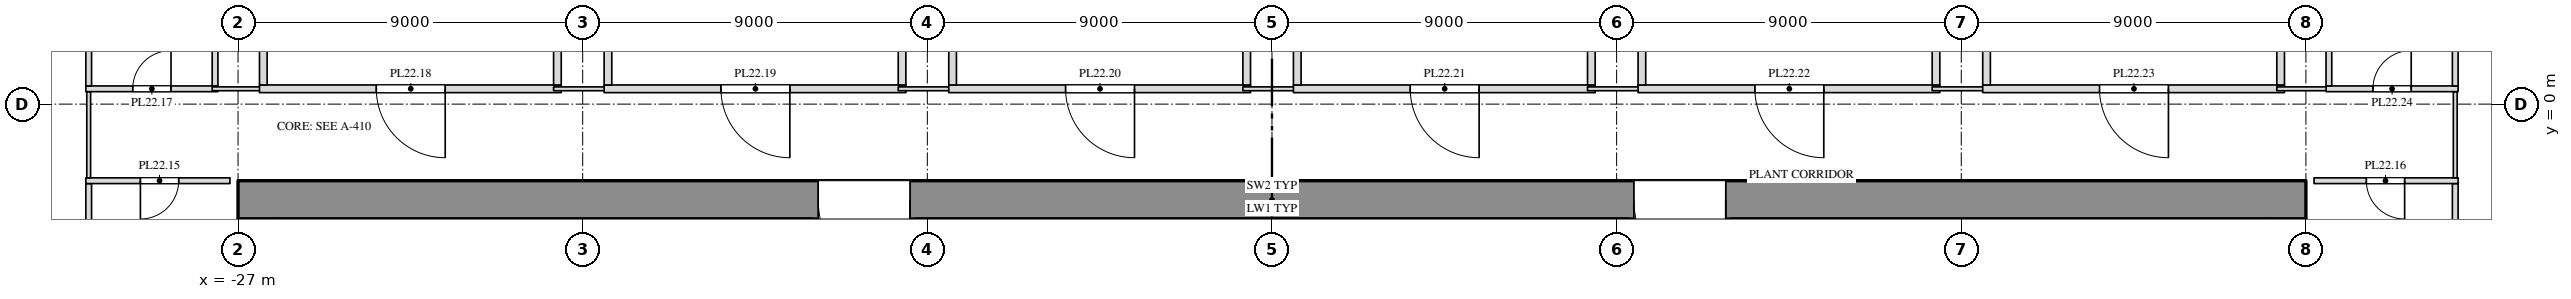
"""IFC4 building model, lengths in metres.
Left out: names, types, materials, properties, quantities, classifications, styles, units other than length and angle.
Written with IfcOpenShell. Run it as: python <this file> out.ifc"""

import sys

from ifc_helpers import new_model, si_unit, direction, frame, frame_2d, origin, place, context, subcontext, project, spatial, rectangle, extrude, element, fill, save


model = new_model("IFC4")
c1 = context("Model", 3, precision=1e-05, world=origin(), true_north=direction((0.0, 1.0)))
c2 = subcontext(c1, "Body", "Model", "MODEL_VIEW")
j1 = project(units=[si_unit("LENGTHUNIT", "METRE"), si_unit("PLANEANGLEUNIT", "RADIAN")], contexts=[c1])
p1 = place(None, origin())
s1 = spatial("IfcSite", under=j1, at=p1, CompositionType="ELEMENT")
p2 = place(p1, origin())
s2 = spatial("IfcBuilding", under=s1, at=p2, CompositionType="ELEMENT")
p3 = place(p2, frame((0.0, 0.0, 104.5)))
s3 = spatial("IfcBuildingStorey", under=s2, at=p3, CompositionType="ELEMENT", Elevation=104.5)
p4 = place(p3, frame((-27.0, -2.5, 0.0), z_axis=(0.0, 0.0, 1.0), x_axis=(1.0, 0.0, 0.0)))
e1 = element("IfcWall", 1, at=p4, inside=s3, PredefinedType="SHEAR", context=c2, shape_type="SweptSolid", body=[
    extrude(rectangle(XDim=54.0, YDim=1.0, at=frame_2d((27.0, 0.0))), origin(), (0.0, 0.0, 1.0), 3.8),
])
p5 = place(p4, frame((15.15, 0.0, 0.0)))
e2 = element("IfcOpeningElement", 2, at=p5, cuts=e1, PredefinedType="OPENING", context=c2, shape_type="SweptSolid", body=[
    extrude(rectangle(XDim=2.4, YDim=2.1, at=frame_2d((1.2, 1.05))), frame((0.0, 0.512, 0.0), z_axis=(0.0, -1.0, 0.0), x_axis=(1.0, 0.0, 0.0)), (0.0, 0.0, 1.0), 1.024),
])
p6 = place(p4, frame((36.45, 0.0, 0.0)))
e3 = element("IfcOpeningElement", 3, at=p6, cuts=e1, PredefinedType="OPENING", context=c2, shape_type="SweptSolid", body=[
    extrude(rectangle(XDim=2.4, YDim=2.1, at=frame_2d((1.2, 1.05))), frame((0.0, 0.512, 0.0), z_axis=(0.0, -1.0, 0.0), x_axis=(1.0, 0.0, 0.0)), (0.0, 0.0, 1.0), 1.024),
])
for number, where, z_axis, x_axis in (
    (4, (-30.9, -13.925, 0.0), (0.0, 0.0, 1.0), (0.0, 1.0, 0.0)),
    (5, (30.9, -13.925, 0.0), (0.0, 0.0, 1.0), (0.0, 1.0, 0.0)),
):
    element("IfcWall", number, at=place(p3, frame(where, z_axis=z_axis, x_axis=x_axis)), inside=s3, PredefinedType="PARTITIONING", context=c2, shape_type="SweptSolid", body=[
        extrude(rectangle(XDim=11.85, YDim=0.15, at=frame_2d((5.925, 0.0))), origin(), (0.0, 0.0, 1.0), 3.8),
    ])
p7 = place(p3, frame((-30.975, -2.0, 0.0), z_axis=(0.0, 0.0, 1.0), x_axis=(1.0, 0.0, 0.0)))
e6 = element("IfcWall", 6, at=p7, inside=s3, PredefinedType="PARTITIONING", context=c2, shape_type="SweptSolid", body=[
    extrude(rectangle(XDim=3.763, YDim=0.15, at=frame_2d((1.882, 0.0))), origin(), (0.0, 0.0, 1.0), 3.8),
])
p8 = place(p7, frame((1.425, 0.0, 0.0)))
e7 = element("IfcOpeningElement", 7, at=p8, cuts=e6, PredefinedType="OPENING", context=c2, shape_type="SweptSolid", body=[
    extrude(rectangle(XDim=1.0, YDim=2.1, at=frame_2d((0.5, 1.05))), frame((0.0, 0.087, 0.0), z_axis=(0.0, -1.0, 0.0), x_axis=(1.0, 0.0, 0.0)), (0.0, 0.0, 1.0), 0.174),
])
p9 = place(p3, frame((-30.9, -1.925, 0.0), z_axis=(0.0, 0.0, 1.0), x_axis=(0.0, 1.0, 0.0)))
e8 = element("IfcWall", 8, at=p9, inside=s3, PredefinedType="PARTITIONING", context=c2, shape_type="SweptSolid", body=[
    extrude(rectangle(XDim=2.25, YDim=0.1, at=frame_2d((1.125, 0.0))), origin(), (0.0, 0.0, 1.0), 3.8),
])
p10 = place(p3, frame((27.212, -2.0, 0.0), z_axis=(0.0, 0.0, 1.0), x_axis=(1.0, 0.0, 0.0)))
e9 = element("IfcWall", 9, at=p10, inside=s3, PredefinedType="PARTITIONING", context=c2, shape_type="SweptSolid", body=[
    extrude(rectangle(XDim=3.763, YDim=0.15, at=frame_2d((1.882, 0.0))), origin(), (0.0, 0.0, 1.0), 3.8),
])
p11 = place(p10, frame((1.366, 0.0, 0.0)))
e10 = element("IfcOpeningElement", 10, at=p11, cuts=e9, PredefinedType="OPENING", context=c2, shape_type="SweptSolid", body=[
    extrude(rectangle(XDim=1.0, YDim=2.1, at=frame_2d((0.5, 1.05))), frame((0.0, 0.087, 0.0), z_axis=(0.0, -1.0, 0.0), x_axis=(1.0, 0.0, 0.0)), (0.0, 0.0, 1.0), 0.174),
])
p12 = place(p3, frame((30.9, -1.925, 0.0), z_axis=(0.0, 0.0, 1.0), x_axis=(0.0, 1.0, 0.0)))
e11 = element("IfcWall", 11, at=p12, inside=s3, PredefinedType="PARTITIONING", context=c2, shape_type="SweptSolid", body=[
    extrude(rectangle(XDim=2.25, YDim=0.1, at=frame_2d((1.125, 0.0))), origin(), (0.0, 0.0, 1.0), 3.8),
])
p13 = place(p3, frame((-30.975, 0.4, 0.0), z_axis=(0.0, 0.0, 1.0), x_axis=(1.0, 0.0, 0.0)))
e12 = element("IfcWall", 12, at=p13, inside=s3, PredefinedType="PARTITIONING", context=c2, shape_type="SweptSolid", body=[
    extrude(rectangle(XDim=3.45, YDim=0.15, at=frame_2d((1.725, 0.0))), origin(), (0.0, 0.0, 1.0), 3.8),
])
p14 = place(p13, frame((1.225, 0.0, 0.0)))
e13 = element("IfcOpeningElement", 13, at=p14, cuts=e12, PredefinedType="OPENING", context=c2, shape_type="SweptSolid", body=[
    extrude(rectangle(XDim=1.0, YDim=2.1, at=frame_2d((0.5, 1.05))), frame((0.0, 0.087, 0.0), z_axis=(0.0, -1.0, 0.0), x_axis=(1.0, 0.0, 0.0)), (0.0, 0.0, 1.0), 0.174),
])
p15 = place(p3, frame((-30.9, 0.475, 0.0), z_axis=(0.0, 0.0, 1.0), x_axis=(0.0, 1.0, 0.0)))
e14 = element("IfcWall", 14, at=p15, inside=s3, PredefinedType="PARTITIONING", context=c2, shape_type="SweptSolid", body=[
    extrude(rectangle(XDim=16.465, YDim=0.15, at=frame_2d((8.232, 0.0))), origin(), (0.0, 0.0, 1.0), 3.8),
])
p16 = place(p3, frame((-27.675, 0.4, 0.0), z_axis=(0.0, 0.0, 1.0), x_axis=(1.0, 0.0, 0.0)))
e15 = element("IfcWall", 15, at=p16, inside=s3, PredefinedType="PARTITIONING", context=c2, shape_type="SweptSolid", body=[
    extrude(rectangle(XDim=1.435, YDim=0.1, at=frame_2d((0.718, 0.0))), origin(), (0.0, 0.0, 1.0), 3.8),
])
p17 = place(p3, frame((-27.6, 0.475, 0.0), z_axis=(0.0, 0.0, 1.0), x_axis=(0.0, 1.0, 0.0)))
e16 = element("IfcWall", 16, at=p17, inside=s3, PredefinedType="PARTITIONING", context=c2, shape_type="SweptSolid", body=[
    extrude(rectangle(XDim=17.505, YDim=0.15, at=frame_2d((8.752, 0.0))), origin(), (0.0, 0.0, 1.0), 3.8),
])
p18 = place(p3, frame((-26.44, 0.4, 0.0), z_axis=(0.0, 0.0, 1.0), x_axis=(1.0, 0.0, 0.0)))
e17 = element("IfcWall", 17, at=p18, inside=s3, PredefinedType="PARTITIONING", context=c2, shape_type="SweptSolid", body=[
    extrude(rectangle(XDim=7.88, YDim=0.2, at=frame_2d((3.94, 0.0))), origin(), (0.0, 0.0, 1.0), 3.8),
])
p19 = place(p18, frame((3.05, 0.0, 0.0)))
e18 = element("IfcOpeningElement", 18, at=p19, cuts=e17, PredefinedType="OPENING", context=c2, shape_type="SweptSolid", body=[
    extrude(rectangle(XDim=1.8, YDim=2.1, at=frame_2d((0.9, 1.05))), frame((0.0, 0.112, 0.0), z_axis=(0.0, -1.0, 0.0), x_axis=(1.0, 0.0, 0.0)), (0.0, 0.0, 1.0), 0.224),
])
p20 = place(p3, frame((-26.34, 0.5, 0.0), z_axis=(0.0, 0.0, 1.0), x_axis=(0.0, 1.0, 0.0)))
e19 = element("IfcWall", 19, at=p20, inside=s3, PredefinedType="PARTITIONING", context=c2, shape_type="SweptSolid", body=[
    extrude(rectangle(XDim=17.5, YDim=0.2, at=frame_2d((8.75, 0.0))), origin(), (0.0, 0.0, 1.0), 3.8),
])
p21 = place(p3, frame((-18.76, 0.4, 0.0), z_axis=(0.0, 0.0, 1.0), x_axis=(1.0, 0.0, 0.0)))
e20 = element("IfcWall", 20, at=p21, inside=s3, PredefinedType="PARTITIONING", context=c2, shape_type="SweptSolid", body=[
    extrude(rectangle(XDim=1.52, YDim=0.1, at=frame_2d((0.76, 0.0))), origin(), (0.0, 0.0, 1.0), 3.8),
])
p22 = place(p3, frame((-18.66, 0.5, 0.0), z_axis=(0.0, 0.0, 1.0), x_axis=(0.0, 1.0, 0.0)))
e21 = element("IfcWall", 21, at=p22, inside=s3, PredefinedType="PARTITIONING", context=c2, shape_type="SweptSolid", body=[
    extrude(rectangle(XDim=17.5, YDim=0.2, at=frame_2d((8.75, 0.0))), origin(), (0.0, 0.0, 1.0), 3.8),
])
p23 = place(p3, frame((-17.44, 0.4, 0.0), z_axis=(0.0, 0.0, 1.0), x_axis=(1.0, 0.0, 0.0)))
e22 = element("IfcWall", 22, at=p23, inside=s3, PredefinedType="PARTITIONING", context=c2, shape_type="SweptSolid", body=[
    extrude(rectangle(XDim=7.88, YDim=0.2, at=frame_2d((3.94, 0.0))), origin(), (0.0, 0.0, 1.0), 3.8),
])
p24 = place(p23, frame((3.05, 0.0, 0.0)))
e23 = element("IfcOpeningElement", 23, at=p24, cuts=e22, PredefinedType="OPENING", context=c2, shape_type="SweptSolid", body=[
    extrude(rectangle(XDim=1.8, YDim=2.1, at=frame_2d((0.9, 1.05))), frame((0.0, 0.112, 0.0), z_axis=(0.0, -1.0, 0.0), x_axis=(1.0, 0.0, 0.0)), (0.0, 0.0, 1.0), 0.224),
])
p25 = place(p3, frame((-17.34, 0.5, 0.0), z_axis=(0.0, 0.0, 1.0), x_axis=(0.0, 1.0, 0.0)))
e24 = element("IfcWall", 24, at=p25, inside=s3, PredefinedType="PARTITIONING", context=c2, shape_type="SweptSolid", body=[
    extrude(rectangle(XDim=15.4, YDim=0.2, at=frame_2d((7.7, 0.0))), origin(), (0.0, 0.0, 1.0), 3.8),
])
p26 = place(p3, frame((-9.76, 0.4, 0.0), z_axis=(0.0, 0.0, 1.0), x_axis=(1.0, 0.0, 0.0)))
e25 = element("IfcWall", 25, at=p26, inside=s3, PredefinedType="PARTITIONING", context=c2, shape_type="SweptSolid", body=[
    extrude(rectangle(XDim=1.52, YDim=0.1, at=frame_2d((0.76, 0.0))), origin(), (0.0, 0.0, 1.0), 3.8),
])
p27 = place(p3, frame((-9.66, 0.5, 0.0), z_axis=(0.0, 0.0, 1.0), x_axis=(0.0, 1.0, 0.0)))
e26 = element("IfcWall", 26, at=p27, inside=s3, PredefinedType="PARTITIONING", context=c2, shape_type="SweptSolid", body=[
    extrude(rectangle(XDim=15.4, YDim=0.2, at=frame_2d((7.7, 0.0))), origin(), (0.0, 0.0, 1.0), 3.8),
])
p28 = place(p3, frame((-8.44, 0.4, 0.0), z_axis=(0.0, 0.0, 1.0), x_axis=(1.0, 0.0, 0.0)))
e27 = element("IfcWall", 27, at=p28, inside=s3, PredefinedType="PARTITIONING", context=c2, shape_type="SweptSolid", body=[
    extrude(rectangle(XDim=7.88, YDim=0.2, at=frame_2d((3.94, 0.0))), origin(), (0.0, 0.0, 1.0), 3.8),
])
p29 = place(p28, frame((3.05, 0.0, 0.0)))
e28 = element("IfcOpeningElement", 28, at=p29, cuts=e27, PredefinedType="OPENING", context=c2, shape_type="SweptSolid", body=[
    extrude(rectangle(XDim=1.8, YDim=2.1, at=frame_2d((0.9, 1.05))), frame((0.0, 0.112, 0.0), z_axis=(0.0, -1.0, 0.0), x_axis=(1.0, 0.0, 0.0)), (0.0, 0.0, 1.0), 0.224),
])
p30 = place(p3, frame((-8.34, 0.5, 0.0), z_axis=(0.0, 0.0, 1.0), x_axis=(0.0, 1.0, 0.0)))
e29 = element("IfcWall", 29, at=p30, inside=s3, PredefinedType="PARTITIONING", context=c2, shape_type="SweptSolid", body=[
    extrude(rectangle(XDim=17.5, YDim=0.2, at=frame_2d((8.75, 0.0))), origin(), (0.0, 0.0, 1.0), 3.8),
])
p31 = place(p3, frame((-0.76, 0.4, 0.0), z_axis=(0.0, 0.0, 1.0), x_axis=(1.0, 0.0, 0.0)))
e30 = element("IfcWall", 30, at=p31, inside=s3, PredefinedType="PARTITIONING", context=c2, shape_type="SweptSolid", body=[
    extrude(rectangle(XDim=1.52, YDim=0.1, at=frame_2d((0.76, 0.0))), origin(), (0.0, 0.0, 1.0), 3.8),
])
p32 = place(p3, frame((-0.66, 0.5, 0.0), z_axis=(0.0, 0.0, 1.0), x_axis=(0.0, 1.0, 0.0)))
e31 = element("IfcWall", 31, at=p32, inside=s3, PredefinedType="PARTITIONING", context=c2, shape_type="SweptSolid", body=[
    extrude(rectangle(XDim=17.5, YDim=0.2, at=frame_2d((8.75, 0.0))), origin(), (0.0, 0.0, 1.0), 3.8),
])
p33 = place(p3, frame((0.56, 0.4, 0.0), z_axis=(0.0, 0.0, 1.0), x_axis=(1.0, 0.0, 0.0)))
e32 = element("IfcWall", 32, at=p33, inside=s3, PredefinedType="PARTITIONING", context=c2, shape_type="SweptSolid", body=[
    extrude(rectangle(XDim=7.88, YDim=0.2, at=frame_2d((3.94, 0.0))), origin(), (0.0, 0.0, 1.0), 3.8),
])
p34 = place(p33, frame((3.05, 0.0, 0.0)))
e33 = element("IfcOpeningElement", 33, at=p34, cuts=e32, PredefinedType="OPENING", context=c2, shape_type="SweptSolid", body=[
    extrude(rectangle(XDim=1.8, YDim=2.1, at=frame_2d((0.9, 1.05))), frame((0.0, 0.112, 0.0), z_axis=(0.0, -1.0, 0.0), x_axis=(1.0, 0.0, 0.0)), (0.0, 0.0, 1.0), 0.224),
])
p35 = place(p3, frame((0.66, 0.5, 0.0), z_axis=(0.0, 0.0, 1.0), x_axis=(0.0, 1.0, 0.0)))
e34 = element("IfcWall", 34, at=p35, inside=s3, PredefinedType="PARTITIONING", context=c2, shape_type="SweptSolid", body=[
    extrude(rectangle(XDim=15.9, YDim=0.2, at=frame_2d((7.95, 0.0))), origin(), (0.0, 0.0, 1.0), 3.8),
])
p36 = place(p3, frame((8.24, 0.4, 0.0), z_axis=(0.0, 0.0, 1.0), x_axis=(1.0, 0.0, 0.0)))
e35 = element("IfcWall", 35, at=p36, inside=s3, PredefinedType="PARTITIONING", context=c2, shape_type="SweptSolid", body=[
    extrude(rectangle(XDim=1.52, YDim=0.1, at=frame_2d((0.76, 0.0))), origin(), (0.0, 0.0, 1.0), 3.8),
])
p37 = place(p3, frame((8.34, 0.5, 0.0), z_axis=(0.0, 0.0, 1.0), x_axis=(0.0, 1.0, 0.0)))
e36 = element("IfcWall", 36, at=p37, inside=s3, PredefinedType="PARTITIONING", context=c2, shape_type="SweptSolid", body=[
    extrude(rectangle(XDim=15.9, YDim=0.2, at=frame_2d((7.95, 0.0))), origin(), (0.0, 0.0, 1.0), 3.8),
])
p38 = place(p3, frame((9.56, 0.4, 0.0), z_axis=(0.0, 0.0, 1.0), x_axis=(1.0, 0.0, 0.0)))
e37 = element("IfcWall", 37, at=p38, inside=s3, PredefinedType="PARTITIONING", context=c2, shape_type="SweptSolid", body=[
    extrude(rectangle(XDim=7.88, YDim=0.2, at=frame_2d((3.94, 0.0))), origin(), (0.0, 0.0, 1.0), 3.8),
])
p39 = place(p38, frame((3.05, 0.0, 0.0)))
e38 = element("IfcOpeningElement", 38, at=p39, cuts=e37, PredefinedType="OPENING", context=c2, shape_type="SweptSolid", body=[
    extrude(rectangle(XDim=1.8, YDim=2.1, at=frame_2d((0.9, 1.05))), frame((0.0, 0.112, 0.0), z_axis=(0.0, -1.0, 0.0), x_axis=(1.0, 0.0, 0.0)), (0.0, 0.0, 1.0), 0.224),
])
p40 = place(p3, frame((9.66, 0.5, 0.0), z_axis=(0.0, 0.0, 1.0), x_axis=(0.0, 1.0, 0.0)))
e39 = element("IfcWall", 39, at=p40, inside=s3, PredefinedType="PARTITIONING", context=c2, shape_type="SweptSolid", body=[
    extrude(rectangle(XDim=17.5, YDim=0.2, at=frame_2d((8.75, 0.0))), origin(), (0.0, 0.0, 1.0), 3.8),
])
p41 = place(p3, frame((17.24, 0.4, 0.0), z_axis=(0.0, 0.0, 1.0), x_axis=(1.0, 0.0, 0.0)))
e40 = element("IfcWall", 40, at=p41, inside=s3, PredefinedType="PARTITIONING", context=c2, shape_type="SweptSolid", body=[
    extrude(rectangle(XDim=1.52, YDim=0.1, at=frame_2d((0.76, 0.0))), origin(), (0.0, 0.0, 1.0), 3.8),
])
p42 = place(p3, frame((17.34, 0.5, 0.0), z_axis=(0.0, 0.0, 1.0), x_axis=(0.0, 1.0, 0.0)))
e41 = element("IfcWall", 41, at=p42, inside=s3, PredefinedType="PARTITIONING", context=c2, shape_type="SweptSolid", body=[
    extrude(rectangle(XDim=17.5, YDim=0.2, at=frame_2d((8.75, 0.0))), origin(), (0.0, 0.0, 1.0), 3.8),
])
p43 = place(p3, frame((18.56, 0.4, 0.0), z_axis=(0.0, 0.0, 1.0), x_axis=(1.0, 0.0, 0.0)))
e42 = element("IfcWall", 42, at=p43, inside=s3, PredefinedType="PARTITIONING", context=c2, shape_type="SweptSolid", body=[
    extrude(rectangle(XDim=7.88, YDim=0.2, at=frame_2d((3.94, 0.0))), origin(), (0.0, 0.0, 1.0), 3.8),
])
p44 = place(p43, frame((3.05, 0.0, 0.0)))
e43 = element("IfcOpeningElement", 43, at=p44, cuts=e42, PredefinedType="OPENING", context=c2, shape_type="SweptSolid", body=[
    extrude(rectangle(XDim=1.8, YDim=2.1, at=frame_2d((0.9, 1.05))), frame((0.0, 0.112, 0.0), z_axis=(0.0, -1.0, 0.0), x_axis=(1.0, 0.0, 0.0)), (0.0, 0.0, 1.0), 0.224),
])
p45 = place(p3, frame((18.66, 0.5, 0.0), z_axis=(0.0, 0.0, 1.0), x_axis=(0.0, 1.0, 0.0)))
e44 = element("IfcWall", 44, at=p45, inside=s3, PredefinedType="PARTITIONING", context=c2, shape_type="SweptSolid", body=[
    extrude(rectangle(XDim=15.4, YDim=0.2, at=frame_2d((7.7, 0.0))), origin(), (0.0, 0.0, 1.0), 3.8),
])
p46 = place(p3, frame((26.24, 0.4, 0.0), z_axis=(0.0, 0.0, 1.0), x_axis=(1.0, 0.0, 0.0)))
e45 = element("IfcWall", 45, at=p46, inside=s3, PredefinedType="PARTITIONING", context=c2, shape_type="SweptSolid", body=[
    extrude(rectangle(XDim=1.435, YDim=0.1, at=frame_2d((0.718, 0.0))), origin(), (0.0, 0.0, 1.0), 3.8),
])
p47 = place(p3, frame((26.34, 0.5, 0.0), z_axis=(0.0, 0.0, 1.0), x_axis=(0.0, 1.0, 0.0)))
e46 = element("IfcWall", 46, at=p47, inside=s3, PredefinedType="PARTITIONING", context=c2, shape_type="SweptSolid", body=[
    extrude(rectangle(XDim=15.4, YDim=0.2, at=frame_2d((7.7, 0.0))), origin(), (0.0, 0.0, 1.0), 3.8),
])
p48 = place(p3, frame((27.525, 0.4, 0.0), z_axis=(0.0, 0.0, 1.0), x_axis=(1.0, 0.0, 0.0)))
e47 = element("IfcWall", 47, at=p48, inside=s3, PredefinedType="PARTITIONING", context=c2, shape_type="SweptSolid", body=[
    extrude(rectangle(XDim=3.45, YDim=0.15, at=frame_2d((1.725, 0.0))), origin(), (0.0, 0.0, 1.0), 3.8),
])
p49 = place(p48, frame((1.225, 0.0, 0.0)))
e48 = element("IfcOpeningElement", 48, at=p49, cuts=e47, PredefinedType="OPENING", context=c2, shape_type="SweptSolid", body=[
    extrude(rectangle(XDim=1.0, YDim=2.1, at=frame_2d((0.5, 1.05))), frame((0.0, 0.087, 0.0), z_axis=(0.0, -1.0, 0.0), x_axis=(1.0, 0.0, 0.0)), (0.0, 0.0, 1.0), 0.174),
])
for number, where, z_axis, x_axis in (
    (49, (27.6, 0.475, 0.0), (0.0, 0.0, 1.0), (0.0, 1.0, 0.0)),
    (50, (30.9, 0.475, 0.0), (0.0, 0.0, 1.0), (0.0, 1.0, 0.0)),
):
    element("IfcWall", number, at=place(p3, frame(where, z_axis=z_axis, x_axis=x_axis)), inside=s3, PredefinedType="PARTITIONING", context=c2, shape_type="SweptSolid", body=[
        extrude(rectangle(XDim=13.925, YDim=0.15, at=frame_2d((6.962, 0.0))), origin(), (0.0, 0.0, 1.0), 3.8),
    ])
p50 = place(p8, origin())
e51 = element("IfcDoor", 51, at=p50, inside=s3, OperationType="SINGLE_SWING_RIGHT", PredefinedType="DOOR", context=c2, shape_type="SweptSolid", body=[
    extrude(rectangle(XDim=1.0, YDim=2.1, at=frame_2d((0.5, 1.05))), frame((0.0, 0.025, 0.0), z_axis=(0.0, -1.0, 0.0), x_axis=(1.0, 0.0, 0.0)), (0.0, 0.0, 1.0), 0.05),
])
fill(e7, e51)
p51 = place(p11, origin())
e52 = element("IfcDoor", 52, at=p51, inside=s3, OperationType="SINGLE_SWING_LEFT", PredefinedType="DOOR", context=c2, shape_type="SweptSolid", body=[
    extrude(rectangle(XDim=1.0, YDim=2.1, at=frame_2d((0.5, 1.05))), frame((0.0, 0.025, 0.0), z_axis=(0.0, -1.0, 0.0), x_axis=(1.0, 0.0, 0.0)), (0.0, 0.0, 1.0), 0.05),
])
fill(e10, e52)
p52 = place(p14, origin())
e53 = element("IfcDoor", 53, at=p52, inside=s3, OperationType="SINGLE_SWING_RIGHT", PredefinedType="DOOR", context=c2, shape_type="SweptSolid", body=[
    extrude(rectangle(XDim=1.0, YDim=2.1, at=frame_2d((0.5, 1.05))), frame((0.0, 0.025, 0.0), z_axis=(0.0, -1.0, 0.0), x_axis=(1.0, 0.0, 0.0)), (0.0, 0.0, 1.0), 0.05),
])
fill(e13, e53)
p53 = place(p19, origin())
e54 = element("IfcDoor", 54, at=p53, inside=s3, OperationType="DOUBLE_DOOR_SINGLE_SWING", PredefinedType="DOOR", context=c2, shape_type="SweptSolid", body=[
    extrude(rectangle(XDim=1.8, YDim=2.1, at=frame_2d((0.9, 1.05))), frame((0.0, 0.025, 0.0), z_axis=(0.0, -1.0, 0.0), x_axis=(1.0, 0.0, 0.0)), (0.0, 0.0, 1.0), 0.05),
])
fill(e18, e54)
p54 = place(p24, origin())
e55 = element("IfcDoor", 55, at=p54, inside=s3, OperationType="DOUBLE_DOOR_SINGLE_SWING", PredefinedType="DOOR", context=c2, shape_type="SweptSolid", body=[
    extrude(rectangle(XDim=1.8, YDim=2.1, at=frame_2d((0.9, 1.05))), frame((0.0, 0.025, 0.0), z_axis=(0.0, -1.0, 0.0), x_axis=(1.0, 0.0, 0.0)), (0.0, 0.0, 1.0), 0.05),
])
fill(e23, e55)
p55 = place(p29, origin())
e56 = element("IfcDoor", 56, at=p55, inside=s3, OperationType="DOUBLE_DOOR_SINGLE_SWING", PredefinedType="DOOR", context=c2, shape_type="SweptSolid", body=[
    extrude(rectangle(XDim=1.8, YDim=2.1, at=frame_2d((0.9, 1.05))), frame((0.0, 0.025, 0.0), z_axis=(0.0, -1.0, 0.0), x_axis=(1.0, 0.0, 0.0)), (0.0, 0.0, 1.0), 0.05),
])
fill(e28, e56)
p56 = place(p34, origin())
e57 = element("IfcDoor", 57, at=p56, inside=s3, OperationType="DOUBLE_DOOR_SINGLE_SWING", PredefinedType="DOOR", context=c2, shape_type="SweptSolid", body=[
    extrude(rectangle(XDim=1.8, YDim=2.1, at=frame_2d((0.9, 1.05))), frame((0.0, 0.025, 0.0), z_axis=(0.0, -1.0, 0.0), x_axis=(1.0, 0.0, 0.0)), (0.0, 0.0, 1.0), 0.05),
])
fill(e33, e57)
p57 = place(p39, origin())
e58 = element("IfcDoor", 58, at=p57, inside=s3, OperationType="DOUBLE_DOOR_SINGLE_SWING", PredefinedType="DOOR", context=c2, shape_type="SweptSolid", body=[
    extrude(rectangle(XDim=1.8, YDim=2.1, at=frame_2d((0.9, 1.05))), frame((0.0, 0.025, 0.0), z_axis=(0.0, -1.0, 0.0), x_axis=(1.0, 0.0, 0.0)), (0.0, 0.0, 1.0), 0.05),
])
fill(e38, e58)
p58 = place(p44, origin())
e59 = element("IfcDoor", 59, at=p58, inside=s3, OperationType="DOUBLE_DOOR_SINGLE_SWING", PredefinedType="DOOR", context=c2, shape_type="SweptSolid", body=[
    extrude(rectangle(XDim=1.8, YDim=2.1, at=frame_2d((0.9, 1.05))), frame((0.0, 0.025, 0.0), z_axis=(0.0, -1.0, 0.0), x_axis=(1.0, 0.0, 0.0)), (0.0, 0.0, 1.0), 0.05),
])
fill(e43, e59)
p59 = place(p49, origin())
e60 = element("IfcDoor", 60, at=p59, inside=s3, OperationType="SINGLE_SWING_RIGHT", PredefinedType="DOOR", context=c2, shape_type="SweptSolid", body=[
    extrude(rectangle(XDim=1.0, YDim=2.1, at=frame_2d((0.5, 1.05))), frame((0.0, 0.025, 0.0), z_axis=(0.0, -1.0, 0.0), x_axis=(1.0, 0.0, 0.0)), (0.0, 0.0, 1.0), 0.05),
])
fill(e48, e60)
p60 = place(p5, origin())
e61 = element("IfcDoor", 61, at=p60, inside=s3, OperationType="DOUBLE_DOOR_SINGLE_SWING", PredefinedType="DOOR", context=c2, shape_type="SweptSolid", body=[
    extrude(rectangle(XDim=2.4, YDim=2.1, at=frame_2d((1.2, 1.05))), frame((0.0, 0.025, 0.0), z_axis=(0.0, -1.0, 0.0), x_axis=(1.0, 0.0, 0.0)), (0.0, 0.0, 1.0), 0.05),
])
fill(e2, e61)
p61 = place(p6, origin())
e62 = element("IfcDoor", 62, at=p61, inside=s3, OperationType="DOUBLE_DOOR_SINGLE_SWING", PredefinedType="DOOR", context=c2, shape_type="SweptSolid", body=[
    extrude(rectangle(XDim=2.4, YDim=2.1, at=frame_2d((1.2, 1.05))), frame((0.0, 0.025, 0.0), z_axis=(0.0, -1.0, 0.0), x_axis=(1.0, 0.0, 0.0)), (0.0, 0.0, 1.0), 0.05),
])
fill(e3, e62)
save(model, sys.argv[1])
